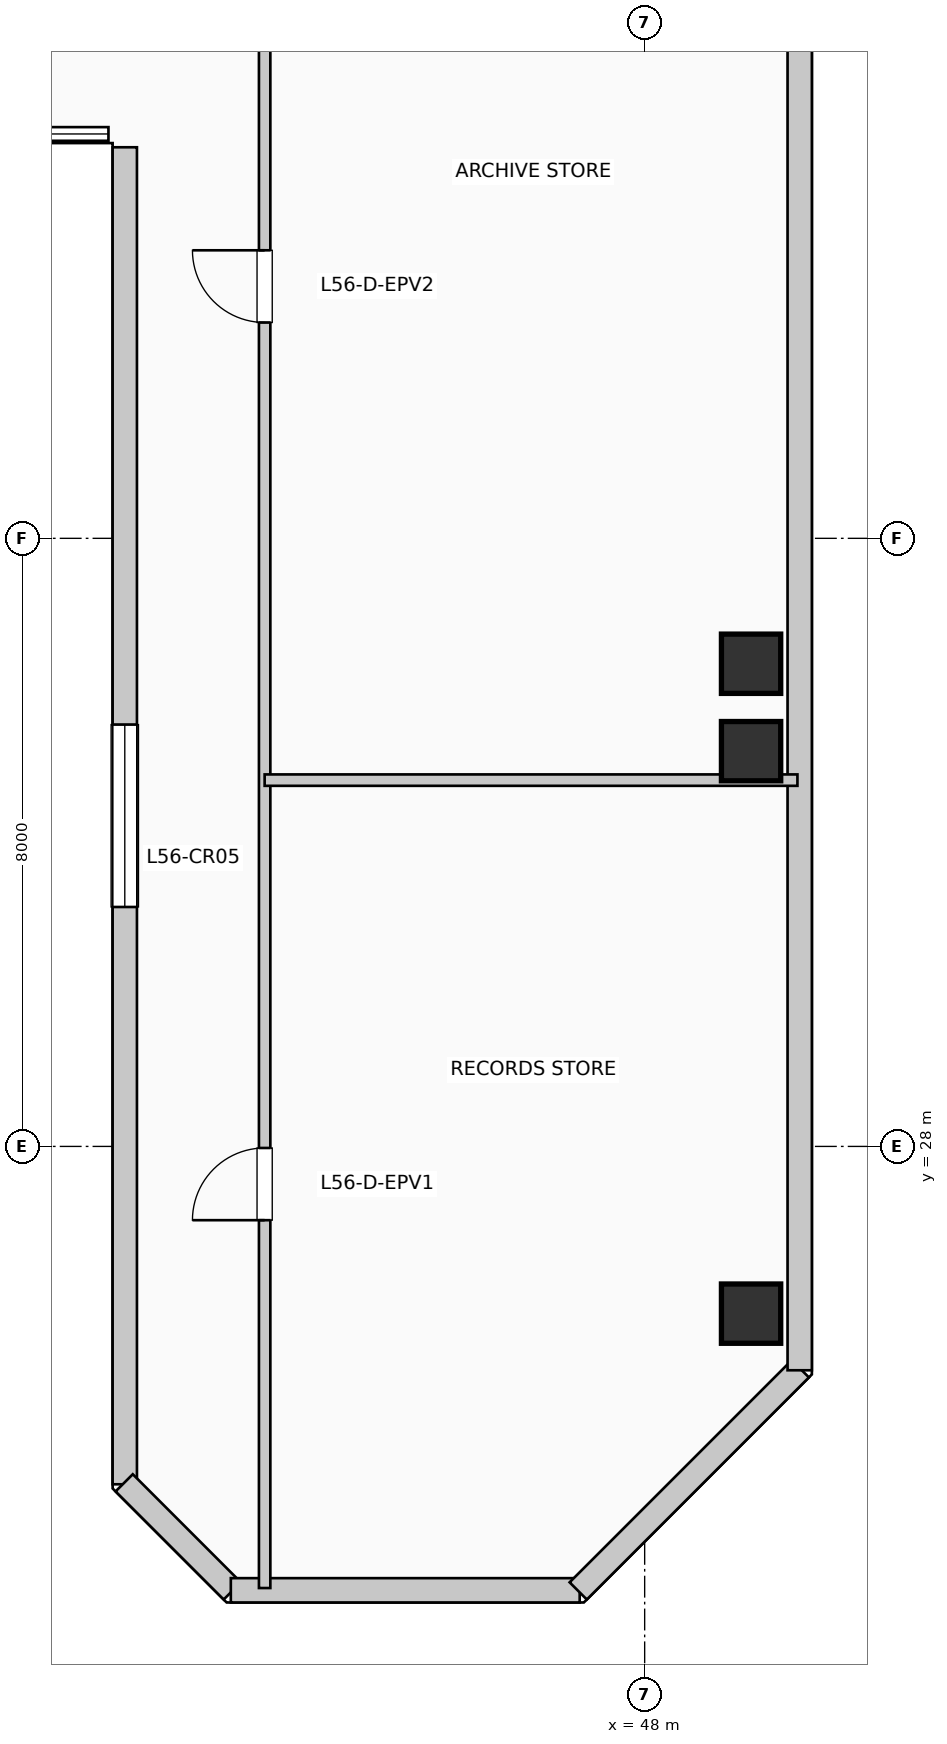
"""IFC4 building model, lengths in metres.
Left out: names, types, materials, properties, quantities, classifications, styles, units other than length and angle.
Written with IfcOpenShell. Run it as: python <this file> out.ifc"""

import sys

from ifc_helpers import new_model, si_unit, direction, frame, frame_2d, origin, origin_2d, place, context, subcontext, project, spatial, rectangle, extrude, element, fill, save


model = new_model("IFC4")
c1 = context("Model", 3, precision=1e-05, world=origin(), true_north=direction((0.0, 1.0)))
c2 = subcontext(c1, "Body", "Model", "MODEL_VIEW")
j1 = project(units=[si_unit("LENGTHUNIT", "METRE"), si_unit("PLANEANGLEUNIT", "RADIAN")], contexts=[c1])
p1 = place(None, origin())
s1 = spatial("IfcSite", under=j1, at=p1, CompositionType="ELEMENT")
p2 = place(p1, origin())
s2 = spatial("IfcBuilding", under=s1, at=p2, CompositionType="ELEMENT")
p3 = place(p2, frame((0.0, 0.0, 231.66)))
s3 = spatial("IfcBuildingStorey", under=s2, at=p3, CompositionType="ELEMENT", Elevation=231.66)
for number, where, z_axis, x_axis in (
    (1, (49.4, 25.8, 0.0), (0.0, 0.0, 1.0), (1.0, 0.0, 0.0)),
    (2, (49.4, 33.2, 0.0), (0.0, 0.0, 1.0), (1.0, 0.0, 0.0)),
    (3, (49.4, 34.35, 0.0), (0.0, 0.0, 1.0), (1.0, 0.0, 0.0)),
):
    element("IfcColumn", number, at=place(p3, frame(where, z_axis=z_axis, x_axis=x_axis)), inside=s3, PredefinedType="COLUMN", context=c2, shape_type="SweptSolid", body=[
        extrude(rectangle(XDim=0.78, YDim=0.78, at=origin_2d()), origin(), (0.0, 0.0, 1.0), 3.96),
    ])
p4 = place(p3, frame((41.16, 41.145, 0.0), z_axis=(0.0, 0.0, 1.0), x_axis=(0.0, -1.0, 0.0)))
e4 = element("IfcWall", 4, at=p4, inside=s3, PredefinedType="SOLIDWALL", context=c2, shape_type="SweptSolid", body=[
    extrude(rectangle(XDim=17.59, YDim=0.32, at=frame_2d((8.795, 0.0))), origin(), (0.0, 0.0, 1.0), 3.71),
])
p5 = place(p4, frame((7.595, 0.0, 0.85)))
e5 = element("IfcOpeningElement", 5, at=p5, cuts=e4, PredefinedType="OPENING", context=c2, shape_type="SweptSolid", body=[
    extrude(rectangle(XDim=2.4, YDim=2.05, at=frame_2d((1.2, 1.025))), frame((0.0, 0.17, 0.0), z_axis=(0.0, -1.0, 0.0), x_axis=(1.0, 0.0, 0.0)), (0.0, 0.0, 1.0), 0.34),
])
p6 = place(p3, frame((41.152, 23.574, 0.0), z_axis=(0.0, 0.0, 1.0), x_axis=(0.707106781187, -0.707106781187, 0.0)))
e6 = element("IfcWall", 6, at=p6, inside=s3, PredefinedType="SOLIDWALL", context=c2, shape_type="SweptSolid", body=[
    extrude(rectangle(XDim=2.011, YDim=0.32, at=frame_2d((1.006, 0.0))), origin(), (0.0, 0.0, 1.0), 3.71),
])
p7 = place(p3, frame((42.555, 22.16, 0.0), z_axis=(0.0, 0.0, 1.0), x_axis=(1.0, 0.0, 0.0)))
e7 = element("IfcWall", 7, at=p7, inside=s3, PredefinedType="SOLIDWALL", context=c2, shape_type="SweptSolid", body=[
    extrude(rectangle(XDim=4.59, YDim=0.32, at=frame_2d((2.295, 0.0))), origin(), (0.0, 0.0, 1.0), 3.71),
])
p8 = place(p3, frame((47.126, 22.152, 0.0), z_axis=(0.0, 0.0, 1.0), x_axis=(0.707136318428, 0.707077242712, 0.0)))
e8 = element("IfcWall", 8, at=p8, inside=s3, PredefinedType="SOLIDWALL", context=c2, shape_type="SweptSolid", body=[
    extrude(rectangle(XDim=4.133, YDim=0.32, at=frame_2d((2.066, 0.0))), origin(), (0.0, 0.0, 1.0), 3.71),
])
p9 = place(p3, frame((50.04, 25.055, 0.0), z_axis=(0.0, 0.0, 1.0), x_axis=(0.0, 1.0, 0.0)))
e9 = element("IfcWall", 9, at=p9, inside=s3, PredefinedType="SOLIDWALL", context=c2, shape_type="SweptSolid", body=[
    extrude(rectangle(XDim=17.89, YDim=0.32, at=frame_2d((8.945, 0.0))), origin(), (0.0, 0.0, 1.0), 3.71),
])
p10 = place(p3, frame((43.0, 22.19, 0.0), z_axis=(0.0, 0.0, 1.0), x_axis=(0.0, 1.0, 0.0)))
e10 = element("IfcWall", 10, at=p10, inside=s3, PredefinedType="PARTITIONING", context=c2, shape_type="SweptSolid", body=[
    extrude(rectangle(XDim=23.62, YDim=0.15, at=frame_2d((11.81, 0.0))), origin(), (0.0, 0.0, 1.0), 3.71),
])
p11 = place(p10, frame((4.84, 0.0, 0.0)))
e11 = element("IfcOpeningElement", 11, at=p11, cuts=e10, PredefinedType="OPENING", context=c2, shape_type="SweptSolid", body=[
    extrude(rectangle(XDim=0.95, YDim=2.15, at=frame_2d((0.475, 1.075))), frame((0.0, 0.085, 0.0), z_axis=(0.0, -1.0, 0.0), x_axis=(1.0, 0.0, 0.0)), (0.0, 0.0, 1.0), 0.17),
])
p12 = place(p10, frame((16.649, 0.0, 0.0)))
e12 = element("IfcOpeningElement", 12, at=p12, cuts=e10, PredefinedType="OPENING", context=c2, shape_type="SweptSolid", body=[
    extrude(rectangle(XDim=0.95, YDim=2.15, at=frame_2d((0.475, 1.075))), frame((0.0, 0.085, 0.0), z_axis=(0.0, -1.0, 0.0), x_axis=(1.0, 0.0, 0.0)), (0.0, 0.0, 1.0), 0.17),
])
p13 = place(p3, frame((43.0, 32.819, 0.0), z_axis=(0.0, 0.0, 1.0), x_axis=(1.0, 0.0, 0.0)))
e13 = element("IfcWall", 13, at=p13, inside=s3, PredefinedType="PARTITIONING", context=c2, shape_type="SweptSolid", body=[
    extrude(rectangle(XDim=7.01, YDim=0.15, at=frame_2d((3.505, 0.0))), origin(), (0.0, 0.0, 1.0), 3.71),
])
p14 = place(p5, origin())
e14 = element("IfcWindow", 14, at=p14, inside=s3, PartitioningType="SINGLE_PANEL", PredefinedType="WINDOW", context=c2, shape_type="SweptSolid", body=[
    extrude(rectangle(XDim=2.4, YDim=2.05, at=frame_2d((1.2, 1.025))), frame((0.0, 0.03, 0.0), z_axis=(0.0, -1.0, 0.0), x_axis=(1.0, 0.0, 0.0)), (0.0, 0.0, 1.0), 0.06),
])
fill(e5, e14)
p15 = place(p11, origin())
e15 = element("IfcDoor", 15, at=p15, inside=s3, OperationType="SINGLE_SWING_LEFT", PredefinedType="DOOR", context=c2, shape_type="SweptSolid", body=[
    extrude(rectangle(XDim=0.95, YDim=2.15, at=frame_2d((0.475, 1.075))), frame((0.0, 0.025, 0.0), z_axis=(0.0, -1.0, 0.0), x_axis=(1.0, 0.0, 0.0)), (0.0, 0.0, 1.0), 0.05),
])
fill(e11, e15)
p16 = place(p12, origin())
e16 = element("IfcDoor", 16, at=p16, inside=s3, OperationType="SINGLE_SWING_RIGHT", PredefinedType="DOOR", context=c2, shape_type="SweptSolid", body=[
    extrude(rectangle(XDim=0.95, YDim=2.15, at=frame_2d((0.475, 1.075))), frame((0.0, 0.025, 0.0), z_axis=(0.0, -1.0, 0.0), x_axis=(1.0, 0.0, 0.0)), (0.0, 0.0, 1.0), 0.05),
])
fill(e12, e16)
save(model, sys.argv[1])
